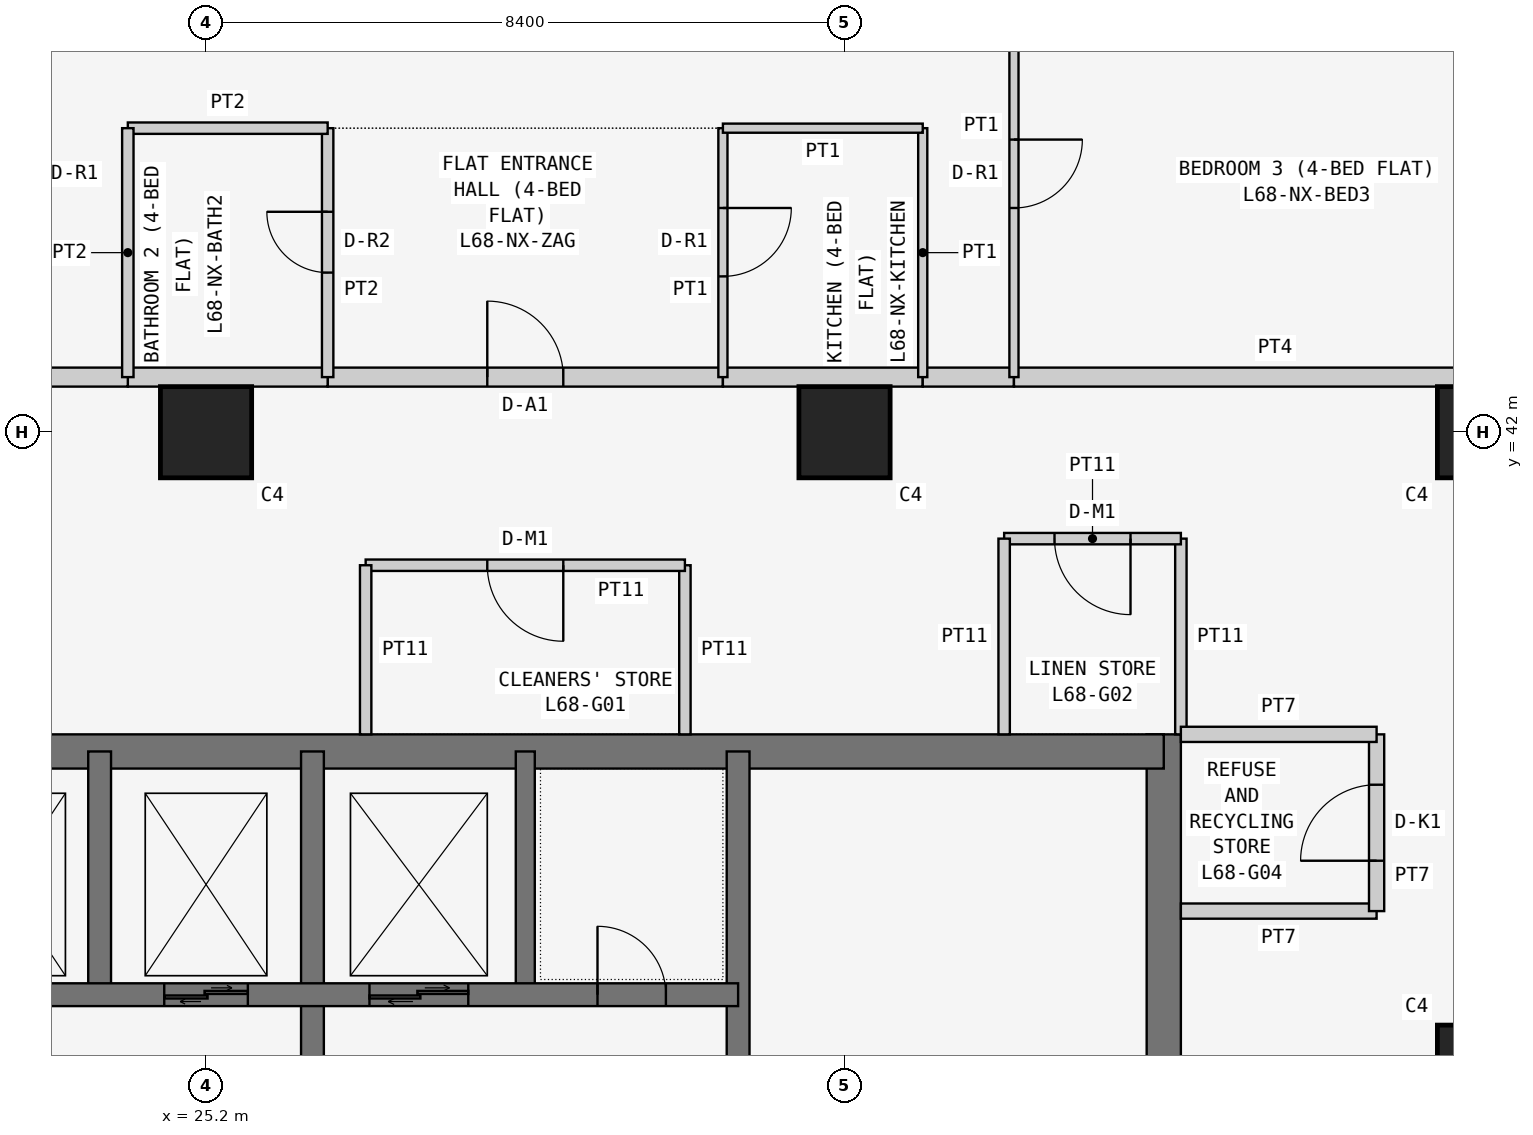
"""IFC4 building model, lengths in metres.
Left out: names, types, materials, properties, quantities, classifications, styles, units other than length and angle.
Written with IfcOpenShell. Run it as: python <this file> out.ifc"""

import sys

from ifc_helpers import new_model, si_unit, direction, frame, frame_2d, origin, origin_2d, place, context, subcontext, project, spatial, rectangle, extrude, element, fill, save


model = new_model("IFC4")
c1 = context("Model", 3, precision=1e-05, world=origin(), true_north=direction((0.0, 1.0)))
c2 = subcontext(c1, "Body", "Model", "MODEL_VIEW")
j1 = project(units=[si_unit("LENGTHUNIT", "METRE"), si_unit("PLANEANGLEUNIT", "RADIAN")], contexts=[c1])
p1 = place(None, origin())
s1 = spatial("IfcSite", under=j1, at=p1, CompositionType="ELEMENT")
p2 = place(p1, origin())
s2 = spatial("IfcBuilding", under=s1, at=p2, CompositionType="ELEMENT")
p3 = place(p2, frame((0.0, 0.0, 261.3)))
s3 = spatial("IfcBuildingStorey", under=s2, at=p3, CompositionType="ELEMENT", Elevation=261.3)
for number, where, z_axis, x_axis in (
    (1, (25.2, 42.0, 0.0), (0.0, 0.0, 1.0), (1.0, 0.0, 0.0)),
    (2, (33.6, 42.0, 0.0), (0.0, 0.0, 1.0), (1.0, 0.0, 0.0)),
    (3, (42.0, 33.6, 0.0), (0.0, 0.0, 1.0), (1.0, 0.0, 0.0)),
    (4, (42.0, 42.0, 0.0), (0.0, 0.0, 1.0), (1.0, 0.0, 0.0)),
):
    element("IfcColumn", number, at=place(p3, frame(where, z_axis=z_axis, x_axis=x_axis)), inside=s3, PredefinedType="COLUMN", context=c2, shape_type="SweptSolid", body=[
        extrude(rectangle(XDim=1.2, YDim=1.2, at=origin_2d()), origin(), (0.0, 0.0, 1.0), 3.6),
    ])
p4 = place(p3, frame((37.8, 21.0, 0.0), z_axis=(0.0, 0.0, 1.0), x_axis=(0.0, 1.0, 0.0)))
e5 = element("IfcWall", 5, at=p4, inside=s3, PredefinedType="SHEAR", context=c2, shape_type="SweptSolid", body=[
    extrude(rectangle(XDim=17.025, YDim=0.45, at=frame_2d((8.512, 0.0))), origin(), (0.0, 0.0, 1.0), 3.6),
])
p5 = place(p4, frame((5.2, 0.0, 0.0)))
e6 = element("IfcOpeningElement", 6, at=p5, cuts=e5, PredefinedType="OPENING", context=c2, shape_type="SweptSolid", body=[
    extrude(rectangle(XDim=1.2, YDim=2.1, at=frame_2d((0.6, 1.05))), frame((0.0, 0.235, 0.0), z_axis=(0.0, -1.0, 0.0), x_axis=(1.0, 0.0, 0.0)), (0.0, 0.0, 1.0), 0.47),
])
p6 = place(p3, frame((37.8, 37.8, 0.0), z_axis=(0.0, 0.0, 1.0), x_axis=(-1.0, 0.0, 0.0)))
e7 = element("IfcWall", 7, at=p6, inside=s3, PredefinedType="SHEAR", context=c2, shape_type="SweptSolid", body=[
    extrude(rectangle(XDim=17.025, YDim=0.45, at=frame_2d((8.513, 0.0))), origin(), (0.0, 0.0, 1.0), 3.6),
])
p7 = place(p3, frame((26.6, 21.0, 0.0), z_axis=(0.0, 0.0, 1.0), x_axis=(0.0, 1.0, 0.0)))
e8 = element("IfcWall", 8, at=p7, inside=s3, PredefinedType="SHEAR", context=c2, shape_type="SweptSolid", body=[
    extrude(rectangle(XDim=16.8, YDim=0.3, at=frame_2d((8.4, 0.0))), origin(), (0.0, 0.0, 1.0), 3.6),
])
p8 = place(p7, frame((10.4, 0.0, 0.0)))
e9 = element("IfcOpeningElement", 9, at=p8, cuts=e8, PredefinedType="OPENING", context=c2, shape_type="SweptSolid", body=[
    extrude(rectangle(XDim=1.2, YDim=2.1, at=frame_2d((0.6, 1.05))), frame((0.0, 0.16, 0.0), z_axis=(0.0, -1.0, 0.0), x_axis=(1.0, 0.0, 0.0)), (0.0, 0.0, 1.0), 0.32),
])
p9 = place(p3, frame((21.0, 34.6, 0.0), z_axis=(0.0, 0.0, 1.0), x_axis=(1.0, 0.0, 0.0)))
e10 = element("IfcWall", 10, at=p9, inside=s3, PredefinedType="SHEAR", context=c2, shape_type="SweptSolid", body=[
    extrude(rectangle(XDim=11.2, YDim=0.3, at=frame_2d((5.6, 0.0))), origin(), (0.0, 0.0, 1.0), 3.6),
])
p10 = place(p9, frame((9.35, 0.0, 0.0)))
e11 = element("IfcOpeningElement", 11, at=p10, cuts=e10, PredefinedType="OPENING", context=c2, shape_type="SweptSolid", body=[
    extrude(rectangle(XDim=0.9, YDim=2.1, at=frame_2d((0.45, 1.05))), frame((0.0, 0.16, 0.0), z_axis=(0.0, -1.0, 0.0), x_axis=(1.0, 0.0, 0.0)), (0.0, 0.0, 1.0), 0.32),
])
p11 = place(p9, frame((1.0, 0.0, 0.0)))
e12 = element("IfcOpeningElement", 12, at=p11, cuts=e10, PredefinedType="OPENING", context=c2, shape_type="SweptSolid", body=[
    extrude(rectangle(XDim=1.1, YDim=2.1, at=frame_2d((0.55, 1.05))), frame((0.0, 0.16, 0.0), z_axis=(0.0, -1.0, 0.0), x_axis=(1.0, 0.0, 0.0)), (0.0, 0.0, 1.0), 0.32),
])
p12 = place(p9, frame((3.65, 0.0, 0.0)))
e13 = element("IfcOpeningElement", 13, at=p12, cuts=e10, PredefinedType="OPENING", context=c2, shape_type="SweptSolid", body=[
    extrude(rectangle(XDim=1.1, YDim=2.1, at=frame_2d((0.55, 1.05))), frame((0.0, 0.16, 0.0), z_axis=(0.0, -1.0, 0.0), x_axis=(1.0, 0.0, 0.0)), (0.0, 0.0, 1.0), 0.32),
])
p13 = place(p9, frame((6.35, 0.0, 0.0)))
e14 = element("IfcOpeningElement", 14, at=p13, cuts=e10, PredefinedType="OPENING", context=c2, shape_type="SweptSolid", body=[
    extrude(rectangle(XDim=1.3, YDim=2.1, at=frame_2d((0.65, 1.05))), frame((0.0, 0.16, 0.0), z_axis=(0.0, -1.0, 0.0), x_axis=(1.0, 0.0, 0.0)), (0.0, 0.0, 1.0), 0.32),
])
p14 = place(p3, frame((23.8, 34.6, 0.0), z_axis=(0.0, 0.0, 1.0), x_axis=(0.0, 1.0, 0.0)))
e15 = element("IfcWall", 15, at=p14, inside=s3, PredefinedType="SHEAR", context=c2, shape_type="SweptSolid", body=[
    extrude(rectangle(XDim=3.2, YDim=0.3, at=frame_2d((1.6, 0.0))), origin(), (0.0, 0.0, 1.0), 3.6),
])
p15 = place(p3, frame((32.2, 29.25, 0.0), z_axis=(0.0, 0.0, 1.0), x_axis=(0.0, 1.0, 0.0)))
e16 = element("IfcWall", 16, at=p15, inside=s3, PredefinedType="SHEAR", context=c2, shape_type="SweptSolid", body=[
    extrude(rectangle(XDim=8.55, YDim=0.3, at=frame_2d((4.275, 0.0))), origin(), (0.0, 0.0, 1.0), 3.6),
])
p16 = place(p3, frame((29.4, 34.6, 0.0), z_axis=(0.0, 0.0, 1.0), x_axis=(0.0, 1.0, 0.0)))
e17 = element("IfcWall", 17, at=p16, inside=s3, PredefinedType="SHEAR", context=c2, shape_type="SweptSolid", body=[
    extrude(rectangle(XDim=3.2, YDim=0.25, at=frame_2d((1.6, 0.0))), origin(), (0.0, 0.0, 1.0), 3.6),
])
p17 = place(p3, frame((31.5, 38.025, 0.0), z_axis=(0.0, 0.0, 1.0), x_axis=(0.0, 1.0, 0.0)))
e18 = element("IfcWall", 18, at=p17, inside=s3, PredefinedType="PARTITIONING", context=c2, shape_type="SweptSolid", body=[
    extrude(rectangle(XDim=2.225, YDim=0.15, at=frame_2d((1.113, 0.0))), origin(), (0.0, 0.0, 1.0), 3.45),
])
p18 = place(p3, frame((31.5, 40.25, 0.0), z_axis=(0.0, 0.0, 1.0), x_axis=(-1.0, 0.0, 0.0)))
e19 = element("IfcWall", 19, at=p18, inside=s3, PredefinedType="PARTITIONING", context=c2, shape_type="SweptSolid", body=[
    extrude(rectangle(XDim=4.2, YDim=0.15, at=frame_2d((2.1, 0.0))), origin(), (0.0, 0.0, 1.0), 3.45),
])
p19 = place(p18, frame((1.6, 0.0, 0.0)))
e20 = element("IfcOpeningElement", 20, at=p19, cuts=e19, PredefinedType="OPENING", context=c2, shape_type="SweptSolid", body=[
    extrude(rectangle(XDim=1.0, YDim=2.1, at=frame_2d((0.5, 1.05))), frame((0.0, 0.085, 0.0), z_axis=(0.0, -1.0, 0.0), x_axis=(1.0, 0.0, 0.0)), (0.0, 0.0, 1.0), 0.17),
])
p20 = place(p3, frame((27.3, 40.25, 0.0), z_axis=(0.0, 0.0, 1.0), x_axis=(0.0, -1.0, 0.0)))
e21 = element("IfcWall", 21, at=p20, inside=s3, PredefinedType="PARTITIONING", context=c2, shape_type="SweptSolid", body=[
    extrude(rectangle(XDim=2.225, YDim=0.15, at=frame_2d((1.113, 0.0))), origin(), (0.0, 0.0, 1.0), 3.45),
])
p21 = place(p3, frame((38.025, 38.025, 0.0), z_axis=(0.0, 0.0, 1.0), x_axis=(0.0, 1.0, 0.0)))
e22 = element("IfcWall", 22, at=p21, inside=s3, PredefinedType="PARTITIONING", context=c2, shape_type="SweptSolid", body=[
    extrude(rectangle(XDim=2.575, YDim=0.15, at=frame_2d((1.288, 0.0))), origin(), (0.0, 0.0, 1.0), 3.45),
])
p22 = place(p3, frame((38.025, 40.6, 0.0), z_axis=(0.0, 0.0, 1.0), x_axis=(-1.0, 0.0, 0.0)))
e23 = element("IfcWall", 23, at=p22, inside=s3, PredefinedType="PARTITIONING", context=c2, shape_type="SweptSolid", body=[
    extrude(rectangle(XDim=2.325, YDim=0.15, at=frame_2d((1.163, 0.0))), origin(), (0.0, 0.0, 1.0), 3.45),
])
p23 = place(p22, frame((0.663, 0.0, 0.0)))
e24 = element("IfcOpeningElement", 24, at=p23, cuts=e23, PredefinedType="OPENING", context=c2, shape_type="SweptSolid", body=[
    extrude(rectangle(XDim=1.0, YDim=2.1, at=frame_2d((0.5, 1.05))), frame((0.0, 0.085, 0.0), z_axis=(0.0, -1.0, 0.0), x_axis=(1.0, 0.0, 0.0)), (0.0, 0.0, 1.0), 0.17),
])
p24 = place(p3, frame((35.7, 40.6, 0.0), z_axis=(0.0, 0.0, 1.0), x_axis=(0.0, -1.0, 0.0)))
e25 = element("IfcWall", 25, at=p24, inside=s3, PredefinedType="PARTITIONING", context=c2, shape_type="SweptSolid", body=[
    extrude(rectangle(XDim=2.575, YDim=0.15, at=frame_2d((1.288, 0.0))), origin(), (0.0, 0.0, 1.0), 3.45),
])
p25 = place(p3, frame((38.025, 35.7, 0.0), z_axis=(0.0, 0.0, 1.0), x_axis=(1.0, 0.0, 0.0)))
e26 = element("IfcWall", 26, at=p25, inside=s3, PredefinedType="PARTITIONING", context=c2, shape_type="SweptSolid", body=[
    extrude(rectangle(XDim=2.575, YDim=0.2, at=frame_2d((1.288, 0.0))), origin(), (0.0, 0.0, 1.0), 3.45),
])
p26 = place(p3, frame((40.6, 35.7, 0.0), z_axis=(0.0, 0.0, 1.0), x_axis=(0.0, 1.0, 0.0)))
e27 = element("IfcWall", 27, at=p26, inside=s3, PredefinedType="PARTITIONING", context=c2, shape_type="SweptSolid", body=[
    extrude(rectangle(XDim=2.325, YDim=0.2, at=frame_2d((1.163, 0.0))), origin(), (0.0, 0.0, 1.0), 3.45),
])
p27 = place(p26, frame((0.663, 0.0, 0.0)))
e28 = element("IfcOpeningElement", 28, at=p27, cuts=e27, PredefinedType="OPENING", context=c2, shape_type="SweptSolid", body=[
    extrude(rectangle(XDim=1.0, YDim=2.1, at=frame_2d((0.5, 1.05))), frame((0.0, 0.11, 0.0), z_axis=(0.0, -1.0, 0.0), x_axis=(1.0, 0.0, 0.0)), (0.0, 0.0, 1.0), 0.22),
])
p28 = place(p3, frame((40.6, 38.025, 0.0), z_axis=(0.0, 0.0, 1.0), x_axis=(-1.0, 0.0, 0.0)))
e29 = element("IfcWall", 29, at=p28, inside=s3, PredefinedType="PARTITIONING", context=c2, shape_type="SweptSolid", body=[
    extrude(rectangle(XDim=2.575, YDim=0.2, at=frame_2d((1.288, 0.0))), origin(), (0.0, 0.0, 1.0), 3.45),
])
p29 = place(p3, frame((26.8, 42.725, 0.0), z_axis=(0.0, 0.0, 1.0), x_axis=(1.0, 0.0, 0.0)))
e30 = element("IfcWall", 30, at=p29, inside=s3, PredefinedType="PARTITIONING", context=c2, shape_type="SweptSolid", body=[
    extrude(rectangle(XDim=5.2, YDim=0.25, at=frame_2d((2.6, 0.0))), origin(), (0.0, 0.0, 1.0), 3.45),
])
p30 = place(p29, frame((2.1, 0.0, 0.0)))
e31 = element("IfcOpeningElement", 31, at=p30, cuts=e30, PredefinedType="OPENING", context=c2, shape_type="SweptSolid", body=[
    extrude(rectangle(XDim=1.0, YDim=2.1, at=frame_2d((0.5, 1.05))), frame((0.0, 0.135, 0.0), z_axis=(0.0, -1.0, 0.0), x_axis=(1.0, 0.0, 0.0)), (0.0, 0.0, 1.0), 0.27),
])
p31 = place(p3, frame((24.171, 42.725, 0.0), z_axis=(0.0, 0.0, 1.0), x_axis=(1.0, 0.0, 0.0)))
e32 = element("IfcWall", 32, at=p31, inside=s3, PredefinedType="PARTITIONING", context=c2, shape_type="SweptSolid", body=[
    extrude(rectangle(XDim=2.629, YDim=0.25, at=frame_2d((1.314, 0.0))), origin(), (0.0, 0.0, 1.0), 3.45),
])
p32 = place(p3, frame((32.0, 42.725, 0.0), z_axis=(0.0, 0.0, 1.0), x_axis=(1.0, 0.0, 0.0)))
e33 = element("IfcWall", 33, at=p32, inside=s3, PredefinedType="PARTITIONING", context=c2, shape_type="SweptSolid", body=[
    extrude(rectangle(XDim=2.629, YDim=0.25, at=frame_2d((1.314, 0.0))), origin(), (0.0, 0.0, 1.0), 3.45),
])
p33 = place(p3, frame((22.971, 42.725, 0.0), z_axis=(0.0, 0.0, 1.0), x_axis=(1.0, 0.0, 0.0)))
e34 = element("IfcWall", 34, at=p33, inside=s3, PredefinedType="PARTITIONING", context=c2, shape_type="SweptSolid", body=[
    extrude(rectangle(XDim=1.2, YDim=0.25, at=frame_2d((0.6, 0.0))), origin(), (0.0, 0.0, 1.0), 3.45),
])
p34 = place(p3, frame((34.629, 42.725, 0.0), z_axis=(0.0, 0.0, 1.0), x_axis=(1.0, 0.0, 0.0)))
e35 = element("IfcWall", 35, at=p34, inside=s3, PredefinedType="PARTITIONING", context=c2, shape_type="SweptSolid", body=[
    extrude(rectangle(XDim=1.2, YDim=0.25, at=frame_2d((0.6, 0.0))), origin(), (0.0, 0.0, 1.0), 3.45),
])
p35 = place(p3, frame((35.829, 42.725, 0.0), z_axis=(0.0, 0.0, 1.0), x_axis=(1.0, 0.0, 0.0)))
e36 = element("IfcWall", 36, at=p35, inside=s3, PredefinedType="PARTITIONING", context=c2, shape_type="SweptSolid", body=[
    extrude(rectangle(XDim=6.871, YDim=0.25, at=frame_2d((3.436, 0.0))), origin(), (0.0, 0.0, 1.0), 3.45),
])
p36 = place(p3, frame((26.8, 46.0, 0.0), z_axis=(0.0, 0.0, 1.0), x_axis=(0.0, -1.0, 0.0)))
e37 = element("IfcWall", 37, at=p36, inside=s3, PredefinedType="PARTITIONING", context=c2, shape_type="SweptSolid", body=[
    extrude(rectangle(XDim=3.275, YDim=0.15, at=frame_2d((1.637, 0.0))), origin(), (0.0, 0.0, 1.0), 3.45),
])
p37 = place(p36, frame((1.1, 0.0, 0.0)))
e38 = element("IfcOpeningElement", 38, at=p37, cuts=e37, PredefinedType="OPENING", context=c2, shape_type="SweptSolid", body=[
    extrude(rectangle(XDim=0.8, YDim=2.1, at=frame_2d((0.4, 1.05))), frame((0.0, 0.085, 0.0), z_axis=(0.0, -1.0, 0.0), x_axis=(1.0, 0.0, 0.0)), (0.0, 0.0, 1.0), 0.17),
])
p38 = place(p3, frame((32.0, 42.725, 0.0), z_axis=(0.0, 0.0, 1.0), x_axis=(0.0, 1.0, 0.0)))
e39 = element("IfcWall", 39, at=p38, inside=s3, PredefinedType="PARTITIONING", context=c2, shape_type="SweptSolid", body=[
    extrude(rectangle(XDim=3.275, YDim=0.12, at=frame_2d((1.637, 0.0))), origin(), (0.0, 0.0, 1.0), 3.45),
])
p39 = place(p38, frame((1.325, 0.0, 0.0)))
e40 = element("IfcOpeningElement", 40, at=p39, cuts=e39, PredefinedType="OPENING", context=c2, shape_type="SweptSolid", body=[
    extrude(rectangle(XDim=0.9, YDim=2.1, at=frame_2d((0.45, 1.05))), frame((0.0, 0.07, 0.0), z_axis=(0.0, -1.0, 0.0), x_axis=(1.0, 0.0, 0.0)), (0.0, 0.0, 1.0), 0.14),
])
p40 = place(p3, frame((26.8, 46.0, 0.0), z_axis=(0.0, 0.0, 1.0), x_axis=(-1.0, 0.0, 0.0)))
e41 = element("IfcWall", 41, at=p40, inside=s3, PredefinedType="PARTITIONING", context=c2, shape_type="SweptSolid", body=[
    extrude(rectangle(XDim=2.629, YDim=0.15, at=frame_2d((1.314, 0.0))), origin(), (0.0, 0.0, 1.0), 3.45),
])
p41 = place(p3, frame((24.171, 46.0, 0.0), z_axis=(0.0, 0.0, 1.0), x_axis=(0.0, -1.0, 0.0)))
e42 = element("IfcWall", 42, at=p41, inside=s3, PredefinedType="PARTITIONING", context=c2, shape_type="SweptSolid", body=[
    extrude(rectangle(XDim=3.275, YDim=0.15, at=frame_2d((1.637, 0.0))), origin(), (0.0, 0.0, 1.0), 3.45),
])
p42 = place(p3, frame((34.629, 42.725, 0.0), z_axis=(0.0, 0.0, 1.0), x_axis=(0.0, 1.0, 0.0)))
e43 = element("IfcWall", 43, at=p42, inside=s3, PredefinedType="PARTITIONING", context=c2, shape_type="SweptSolid", body=[
    extrude(rectangle(XDim=3.275, YDim=0.12, at=frame_2d((1.637, 0.0))), origin(), (0.0, 0.0, 1.0), 3.45),
])
p43 = place(p3, frame((34.629, 46.0, 0.0), z_axis=(0.0, 0.0, 1.0), x_axis=(-1.0, 0.0, 0.0)))
e44 = element("IfcWall", 44, at=p43, inside=s3, PredefinedType="PARTITIONING", context=c2, shape_type="SweptSolid", body=[
    extrude(rectangle(XDim=2.629, YDim=0.12, at=frame_2d((1.314, 0.0))), origin(), (0.0, 0.0, 1.0), 3.45),
])
p44 = place(p3, frame((35.829, 47.8, 0.0), z_axis=(0.0, 0.0, 1.0), x_axis=(0.0, -1.0, 0.0)))
e45 = element("IfcWall", 45, at=p44, inside=s3, PredefinedType="PARTITIONING", context=c2, shape_type="SweptSolid", body=[
    extrude(rectangle(XDim=5.075, YDim=0.12, at=frame_2d((2.538, 0.0))), origin(), (0.0, 0.0, 1.0), 3.45),
])
p45 = place(p44, frame((1.95, 0.0, 0.0)))
e46 = element("IfcOpeningElement", 46, at=p45, cuts=e45, PredefinedType="OPENING", context=c2, shape_type="SweptSolid", body=[
    extrude(rectangle(XDim=0.9, YDim=2.1, at=frame_2d((0.45, 1.05))), frame((0.0, 0.07, 0.0), z_axis=(0.0, -1.0, 0.0), x_axis=(1.0, 0.0, 0.0)), (0.0, 0.0, 1.0), 0.14),
])
p46 = place(p19, origin())
e47 = element("IfcDoor", 47, at=p46, inside=s3, OperationType="SINGLE_SWING_LEFT", PredefinedType="DOOR", context=c2, shape_type="SweptSolid", body=[
    extrude(rectangle(XDim=1.0, YDim=2.1, at=frame_2d((0.5, 1.05))), frame((0.0, 0.025, 0.0), z_axis=(0.0, -1.0, 0.0), x_axis=(1.0, 0.0, 0.0)), (0.0, 0.0, 1.0), 0.05),
])
fill(e20, e47)
p47 = place(p23, origin())
e48 = element("IfcDoor", 48, at=p47, inside=s3, OperationType="SINGLE_SWING_LEFT", PredefinedType="DOOR", context=c2, shape_type="SweptSolid", body=[
    extrude(rectangle(XDim=1.0, YDim=2.1, at=frame_2d((0.5, 1.05))), frame((0.0, 0.025, 0.0), z_axis=(0.0, -1.0, 0.0), x_axis=(1.0, 0.0, 0.0)), (0.0, 0.0, 1.0), 0.05),
])
fill(e24, e48)
p48 = place(p27, origin())
e49 = element("IfcDoor", 49, at=p48, inside=s3, OperationType="SINGLE_SWING_LEFT", PredefinedType="DOOR", context=c2, shape_type="SweptSolid", body=[
    extrude(rectangle(XDim=1.0, YDim=2.1, at=frame_2d((0.5, 1.05))), frame((0.0, 0.025, 0.0), z_axis=(0.0, -1.0, 0.0), x_axis=(1.0, 0.0, 0.0)), (0.0, 0.0, 1.0), 0.05),
])
fill(e28, e49)
p49 = place(p30, origin())
e50 = element("IfcDoor", 50, at=p49, inside=s3, OperationType="SINGLE_SWING_LEFT", PredefinedType="DOOR", context=c2, shape_type="SweptSolid", body=[
    extrude(rectangle(XDim=1.0, YDim=2.1, at=frame_2d((0.5, 1.05))), frame((0.0, 0.025, 0.0), z_axis=(0.0, -1.0, 0.0), x_axis=(1.0, 0.0, 0.0)), (0.0, 0.0, 1.0), 0.05),
])
fill(e31, e50)
p50 = place(p37, frame((0.8, 0.0, 0.0), z_axis=(0.0, 0.0, 1.0), x_axis=(-1.0, 0.0, 0.0)))
e51 = element("IfcDoor", 51, at=p50, inside=s3, OperationType="SINGLE_SWING_RIGHT", PredefinedType="DOOR", context=c2, shape_type="SweptSolid", body=[
    extrude(rectangle(XDim=0.8, YDim=2.1, at=frame_2d((0.4, 1.05))), frame((0.0, 0.025, 0.0), z_axis=(0.0, -1.0, 0.0), x_axis=(1.0, 0.0, 0.0)), (0.0, 0.0, 1.0), 0.05),
])
fill(e38, e51)
p51 = place(p39, frame((0.9, 0.0, 0.0), z_axis=(0.0, 0.0, 1.0), x_axis=(-1.0, 0.0, 0.0)))
e52 = element("IfcDoor", 52, at=p51, inside=s3, OperationType="SINGLE_SWING_LEFT", PredefinedType="DOOR", context=c2, shape_type="SweptSolid", body=[
    extrude(rectangle(XDim=0.9, YDim=2.1, at=frame_2d((0.45, 1.05))), frame((0.0, 0.025, 0.0), z_axis=(0.0, -1.0, 0.0), x_axis=(1.0, 0.0, 0.0)), (0.0, 0.0, 1.0), 0.05),
])
fill(e40, e52)
p52 = place(p45, origin())
e53 = element("IfcDoor", 53, at=p52, inside=s3, OperationType="SINGLE_SWING_LEFT", PredefinedType="DOOR", context=c2, shape_type="SweptSolid", body=[
    extrude(rectangle(XDim=0.9, YDim=2.1, at=frame_2d((0.45, 1.05))), frame((0.0, 0.025, 0.0), z_axis=(0.0, -1.0, 0.0), x_axis=(1.0, 0.0, 0.0)), (0.0, 0.0, 1.0), 0.05),
])
fill(e46, e53)
p53 = place(p10, origin())
e54 = element("IfcDoor", 54, at=p53, inside=s3, OperationType="SINGLE_SWING_LEFT", PredefinedType="DOOR", context=c2, shape_type="SweptSolid", body=[
    extrude(rectangle(XDim=0.9, YDim=2.1, at=frame_2d((0.45, 1.05))), frame((0.0, 0.025, 0.0), z_axis=(0.0, -1.0, 0.0), x_axis=(1.0, 0.0, 0.0)), (0.0, 0.0, 1.0), 0.05),
])
fill(e11, e54)
p54 = place(p12, origin())
e55 = element("IfcDoor", 55, at=p54, inside=s3, OperationType="DOUBLE_DOOR_SLIDING", PredefinedType="DOOR", context=c2, shape_type="SweptSolid", body=[
    extrude(rectangle(XDim=1.1, YDim=2.1, at=frame_2d((0.55, 1.05))), frame((0.0, 0.025, 0.0), z_axis=(0.0, -1.0, 0.0), x_axis=(1.0, 0.0, 0.0)), (0.0, 0.0, 1.0), 0.05),
])
fill(e13, e55)
p55 = place(p13, origin())
e56 = element("IfcDoor", 56, at=p55, inside=s3, OperationType="DOUBLE_DOOR_SLIDING", PredefinedType="DOOR", context=c2, shape_type="SweptSolid", body=[
    extrude(rectangle(XDim=1.3, YDim=2.1, at=frame_2d((0.65, 1.05))), frame((0.0, 0.025, 0.0), z_axis=(0.0, -1.0, 0.0), x_axis=(1.0, 0.0, 0.0)), (0.0, 0.0, 1.0), 0.05),
])
fill(e14, e56)
save(model, sys.argv[1])
